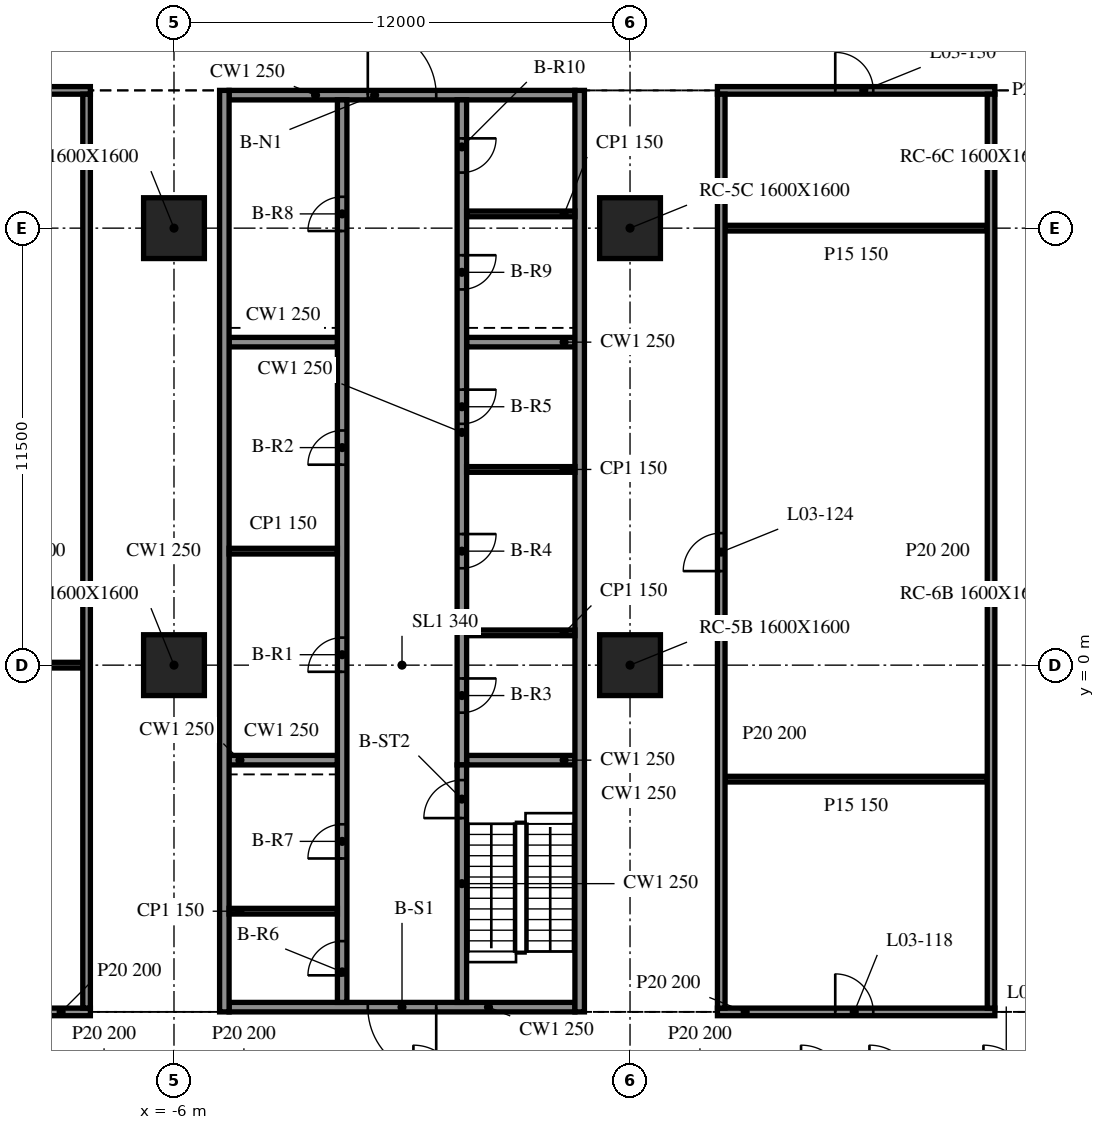
"""IFC4 building model, lengths in metres.
Left out: names, types, materials, properties, quantities, classifications, styles, units other than length and angle.
Written with IfcOpenShell. Run it as: python <this file> out.ifc"""

import sys

from ifc_helpers import new_model, si_unit, direction, frame, frame_2d, origin, origin_2d, place, context, subcontext, project, spatial, rectangle, extrude, element, fill, save


model = new_model("IFC4")
c1 = context("Model", 3, precision=1e-05, world=origin(), true_north=direction((0.0, 1.0)))
c2 = subcontext(c1, "Body", "Model", "MODEL_VIEW")
j1 = project(units=[si_unit("LENGTHUNIT", "METRE"), si_unit("PLANEANGLEUNIT", "RADIAN")], contexts=[c1])
p1 = place(None, origin())
s1 = spatial("IfcSite", under=j1, at=p1, CompositionType="ELEMENT")
p2 = place(p1, origin())
s2 = spatial("IfcBuilding", under=s1, at=p2, CompositionType="ELEMENT")
p3 = place(p2, frame((0.0, 0.0, 15.8)))
s3 = spatial("IfcBuildingStorey", under=s2, at=p3, CompositionType="ELEMENT", Elevation=15.8)
for number, where, z_axis, x_axis in (
    (1, (-6.0, 0.0, -0.34), (0.0, 0.0, 1.0), (1.0, 0.0, 0.0)),
    (2, (-6.0, 11.5, -0.34), (0.0, 0.0, 1.0), (1.0, 0.0, 0.0)),
    (3, (6.0, 0.0, -0.34), (0.0, 0.0, 1.0), (1.0, 0.0, 0.0)),
    (4, (6.0, 11.5, -0.34), (0.0, 0.0, 1.0), (1.0, 0.0, 0.0)),
):
    element("IfcColumn", number, at=place(p3, frame(where, z_axis=z_axis, x_axis=x_axis)), inside=s3, PredefinedType="COLUMN", context=c2, shape_type="SweptSolid", body=[
        extrude(rectangle(XDim=1.6, YDim=1.6, at=origin_2d()), origin(), (0.0, 0.0, 1.0), 4.3),
    ])
for number, where, z_axis, x_axis in (
    (5, (-4.675, 15.125, 0.0), (0.0, 0.0, 1.0), (0.0, -1.0, 0.0)),
    (6, (4.675, -9.125, 0.0), (0.0, 0.0, 1.0), (0.0, 1.0, 0.0)),
):
    element("IfcWall", number, at=place(p3, frame(where, z_axis=z_axis, x_axis=x_axis)), inside=s3, PredefinedType="SOLIDWALL", context=c2, shape_type="SweptSolid", body=[
        extrude(rectangle(XDim=24.25, YDim=0.25, at=frame_2d((12.125, 0.0))), origin(), (0.0, 0.0, 1.0), 3.96),
    ])
p4 = place(p3, frame((4.55, -9.0, 0.0), z_axis=(0.0, 0.0, 1.0), x_axis=(-1.0, 0.0, 0.0)))
e7 = element("IfcWall", 7, at=p4, inside=s3, PredefinedType="SOLIDWALL", context=c2, shape_type="SweptSolid", body=[
    extrude(rectangle(XDim=9.1, YDim=0.25, at=frame_2d((4.55, 0.0))), origin(), (0.0, 0.0, 1.0), 3.96),
])
p5 = place(p4, frame((3.65, 0.0, 0.0)))
e8 = element("IfcOpeningElement", 8, at=p5, cuts=e7, PredefinedType="OPENING", context=c2, shape_type="SweptSolid", body=[
    extrude(rectangle(XDim=1.8, YDim=2.1, at=frame_2d((0.9, 1.05))), frame((0.0, 0.135, 0.0), z_axis=(0.0, -1.0, 0.0), x_axis=(1.0, 0.0, 0.0)), (0.0, 0.0, 1.0), 0.27),
])
p6 = place(p3, frame((-4.55, 15.0, 0.0), z_axis=(0.0, 0.0, 1.0), x_axis=(1.0, 0.0, 0.0)))
e9 = element("IfcWall", 9, at=p6, inside=s3, PredefinedType="SOLIDWALL", context=c2, shape_type="SweptSolid", body=[
    extrude(rectangle(XDim=9.1, YDim=0.25, at=frame_2d((4.55, 0.0))), origin(), (0.0, 0.0, 1.0), 3.96),
])
p7 = place(p6, frame((3.65, 0.0, 0.0)))
e10 = element("IfcOpeningElement", 10, at=p7, cuts=e9, PredefinedType="OPENING", context=c2, shape_type="SweptSolid", body=[
    extrude(rectangle(XDim=1.8, YDim=2.1, at=frame_2d((0.9, 1.05))), frame((0.0, 0.135, 0.0), z_axis=(0.0, -1.0, 0.0), x_axis=(1.0, 0.0, 0.0)), (0.0, 0.0, 1.0), 0.27),
])
p8 = place(p3, frame((-1.575, -8.875, 0.0), z_axis=(0.0, 0.0, 1.0), x_axis=(0.0, 1.0, 0.0)))
e11 = element("IfcWall", 11, at=p8, inside=s3, PredefinedType="SOLIDWALL", context=c2, shape_type="SweptSolid", body=[
    extrude(rectangle(XDim=23.75, YDim=0.25, at=frame_2d((11.875, 0.0))), origin(), (0.0, 0.0, 1.0), 3.96),
])
p9 = place(p8, frame((8.7, 0.0, 0.0)))
e12 = element("IfcOpeningElement", 12, at=p9, cuts=e11, PredefinedType="OPENING", context=c2, shape_type="SweptSolid", body=[
    extrude(rectangle(XDim=0.9, YDim=2.1, at=frame_2d((0.45, 1.05))), frame((0.0, 0.135, 0.0), z_axis=(0.0, -1.0, 0.0), x_axis=(1.0, 0.0, 0.0)), (0.0, 0.0, 1.0), 0.27),
])
p10 = place(p8, frame((14.15, 0.0, 0.0)))
e13 = element("IfcOpeningElement", 13, at=p10, cuts=e11, PredefinedType="OPENING", context=c2, shape_type="SweptSolid", body=[
    extrude(rectangle(XDim=0.9, YDim=2.1, at=frame_2d((0.45, 1.05))), frame((0.0, 0.135, 0.0), z_axis=(0.0, -1.0, 0.0), x_axis=(1.0, 0.0, 0.0)), (0.0, 0.0, 1.0), 0.27),
])
p11 = place(p8, frame((0.712, 0.0, 0.0)))
e14 = element("IfcOpeningElement", 14, at=p11, cuts=e11, PredefinedType="OPENING", context=c2, shape_type="SweptSolid", body=[
    extrude(rectangle(XDim=0.9, YDim=2.1, at=frame_2d((0.45, 1.05))), frame((0.0, 0.135, 0.0), z_axis=(0.0, -1.0, 0.0), x_axis=(1.0, 0.0, 0.0)), (0.0, 0.0, 1.0), 0.27),
])
p12 = place(p8, frame((3.788, 0.0, 0.0)))
e15 = element("IfcOpeningElement", 15, at=p12, cuts=e11, PredefinedType="OPENING", context=c2, shape_type="SweptSolid", body=[
    extrude(rectangle(XDim=0.9, YDim=2.1, at=frame_2d((0.45, 1.05))), frame((0.0, 0.135, 0.0), z_axis=(0.0, -1.0, 0.0), x_axis=(1.0, 0.0, 0.0)), (0.0, 0.0, 1.0), 0.27),
])
p13 = place(p8, frame((20.3, 0.0, 0.0)))
e16 = element("IfcOpeningElement", 16, at=p13, cuts=e11, PredefinedType="OPENING", context=c2, shape_type="SweptSolid", body=[
    extrude(rectangle(XDim=0.9, YDim=2.1, at=frame_2d((0.45, 1.05))), frame((0.0, 0.135, 0.0), z_axis=(0.0, -1.0, 0.0), x_axis=(1.0, 0.0, 0.0)), (0.0, 0.0, 1.0), 0.27),
])
p14 = place(p3, frame((1.575, -8.875, 0.0), z_axis=(0.0, 0.0, 1.0), x_axis=(0.0, 1.0, 0.0)))
e17 = element("IfcWall", 17, at=p14, inside=s3, PredefinedType="SOLIDWALL", context=c2, shape_type="SweptSolid", body=[
    extrude(rectangle(XDim=6.25, YDim=0.25, at=frame_2d((3.125, 0.0))), origin(), (0.0, 0.0, 1.0), 3.96),
])
p15 = place(p14, frame((4.85, 0.0, 0.0)))
e18 = element("IfcOpeningElement", 18, at=p15, cuts=e17, PredefinedType="OPENING", context=c2, shape_type="SweptSolid", body=[
    extrude(rectangle(XDim=1.0, YDim=2.1, at=frame_2d((0.5, 1.05))), frame((0.0, 0.135, 0.0), z_axis=(0.0, -1.0, 0.0), x_axis=(1.0, 0.0, 0.0)), (0.0, 0.0, 1.0), 0.27),
])
p16 = place(p3, frame((1.575, 14.875, 0.0), z_axis=(0.0, 0.0, 1.0), x_axis=(0.0, -1.0, 0.0)))
e19 = element("IfcWall", 19, at=p16, inside=s3, PredefinedType="SOLIDWALL", context=c2, shape_type="SweptSolid", body=[
    extrude(rectangle(XDim=17.5, YDim=0.25, at=frame_2d((8.75, 0.0))), origin(), (0.0, 0.0, 1.0), 3.96),
])
p17 = place(p16, frame((15.225, 0.0, 0.0)))
e20 = element("IfcOpeningElement", 20, at=p17, cuts=e19, PredefinedType="OPENING", context=c2, shape_type="SweptSolid", body=[
    extrude(rectangle(XDim=0.9, YDim=2.1, at=frame_2d((0.45, 1.05))), frame((0.0, 0.135, 0.0), z_axis=(0.0, -1.0, 0.0), x_axis=(1.0, 0.0, 0.0)), (0.0, 0.0, 1.0), 0.27),
])
p18 = place(p16, frame((11.425, 0.0, 0.0)))
e21 = element("IfcOpeningElement", 21, at=p18, cuts=e19, PredefinedType="OPENING", context=c2, shape_type="SweptSolid", body=[
    extrude(rectangle(XDim=0.9, YDim=2.1, at=frame_2d((0.45, 1.05))), frame((0.0, 0.135, 0.0), z_axis=(0.0, -1.0, 0.0), x_axis=(1.0, 0.0, 0.0)), (0.0, 0.0, 1.0), 0.27),
])
p19 = place(p16, frame((7.625, 0.0, 0.0)))
e22 = element("IfcOpeningElement", 22, at=p19, cuts=e19, PredefinedType="OPENING", context=c2, shape_type="SweptSolid", body=[
    extrude(rectangle(XDim=0.9, YDim=2.1, at=frame_2d((0.45, 1.05))), frame((0.0, 0.135, 0.0), z_axis=(0.0, -1.0, 0.0), x_axis=(1.0, 0.0, 0.0)), (0.0, 0.0, 1.0), 0.27),
])
p20 = place(p16, frame((4.087, 0.0, 0.0)))
e23 = element("IfcOpeningElement", 23, at=p20, cuts=e19, PredefinedType="OPENING", context=c2, shape_type="SweptSolid", body=[
    extrude(rectangle(XDim=0.9, YDim=2.1, at=frame_2d((0.45, 1.05))), frame((0.0, 0.135, 0.0), z_axis=(0.0, -1.0, 0.0), x_axis=(1.0, 0.0, 0.0)), (0.0, 0.0, 1.0), 0.27),
])
p21 = place(p16, frame((1.012, 0.0, 0.0)))
e24 = element("IfcOpeningElement", 24, at=p21, cuts=e19, PredefinedType="OPENING", context=c2, shape_type="SweptSolid", body=[
    extrude(rectangle(XDim=0.9, YDim=2.1, at=frame_2d((0.45, 1.05))), frame((0.0, 0.135, 0.0), z_axis=(0.0, -1.0, 0.0), x_axis=(1.0, 0.0, 0.0)), (0.0, 0.0, 1.0), 0.27),
])
for number, where, z_axis, x_axis in (
    (25, (-4.55, -2.5, 0.0), (0.0, 0.0, 1.0), (1.0, 0.0, 0.0)),
    (26, (-4.55, 8.5, 0.0), (0.0, 0.0, 1.0), (1.0, 0.0, 0.0)),
    (27, (1.7, -2.5, 0.0), (0.0, 0.0, 1.0), (1.0, 0.0, 0.0)),
    (28, (1.7, 8.5, 0.0), (0.0, 0.0, 1.0), (1.0, 0.0, 0.0)),
):
    element("IfcWall", number, at=place(p3, frame(where, z_axis=z_axis, x_axis=x_axis)), inside=s3, PredefinedType="SOLIDWALL", context=c2, shape_type="SweptSolid", body=[
        extrude(rectangle(XDim=2.85, YDim=0.25, at=frame_2d((1.425, 0.0))), origin(), (0.0, 0.0, 1.0), 3.96),
    ])
for number, where, z_axis, x_axis in (
    (29, (-4.55, 3.0, 0.0), (0.0, 0.0, 1.0), (1.0, 0.0, 0.0)),
    (30, (1.7, 0.85, 0.0), (0.0, 0.0, 1.0), (1.0, 0.0, 0.0)),
    (31, (1.7, 5.15, 0.0), (0.0, 0.0, 1.0), (1.0, 0.0, 0.0)),
    (32, (-4.55, -6.475, 0.0), (0.0, 0.0, 1.0), (1.0, 0.0, 0.0)),
    (33, (1.7, 11.875, 0.0), (0.0, 0.0, 1.0), (1.0, 0.0, 0.0)),
):
    element("IfcWall", number, at=place(p3, frame(where, z_axis=z_axis, x_axis=x_axis)), inside=s3, PredefinedType="PARTITIONING", context=c2, shape_type="SweptSolid", body=[
        extrude(rectangle(XDim=2.85, YDim=0.15, at=frame_2d((1.425, 0.0))), origin(), (0.0, 0.0, 1.0), 3.96),
    ])
p22 = place(p3, frame((-15.9, -9.125, 0.0), z_axis=(0.0, 0.0, 1.0), x_axis=(1.0, 0.0, 0.0)))
e34 = element("IfcWall", 34, at=p22, inside=s3, PredefinedType="PARTITIONING", context=c2, shape_type="SweptSolid", body=[
    extrude(rectangle(XDim=7.7, YDim=0.2, at=frame_2d((3.85, 0.0))), origin(), (0.0, 0.0, 1.0), 3.96),
])
p23 = place(p22, frame((3.3, 0.0, 0.0)))
e35 = element("IfcOpeningElement", 35, at=p23, cuts=e34, PredefinedType="OPENING", context=c2, shape_type="SweptSolid", body=[
    extrude(rectangle(XDim=1.0, YDim=2.1, at=frame_2d((0.5, 1.05))), frame((0.0, 0.11, 0.0), z_axis=(0.0, -1.0, 0.0), x_axis=(1.0, 0.0, 0.0)), (0.0, 0.0, 1.0), 0.22),
])
p24 = place(p3, frame((8.3, -9.125, 0.0), z_axis=(0.0, 0.0, 1.0), x_axis=(1.0, 0.0, 0.0)))
e36 = element("IfcWall", 36, at=p24, inside=s3, PredefinedType="PARTITIONING", context=c2, shape_type="SweptSolid", body=[
    extrude(rectangle(XDim=7.3, YDim=0.2, at=frame_2d((3.65, 0.0))), origin(), (0.0, 0.0, 1.0), 3.96),
])
p25 = place(p24, frame((3.1, 0.0, 0.0)))
e37 = element("IfcOpeningElement", 37, at=p25, cuts=e36, PredefinedType="OPENING", context=c2, shape_type="SweptSolid", body=[
    extrude(rectangle(XDim=1.0, YDim=2.1, at=frame_2d((0.5, 1.05))), frame((0.0, 0.11, 0.0), z_axis=(0.0, -1.0, 0.0), x_axis=(1.0, 0.0, 0.0)), (0.0, 0.0, 1.0), 0.22),
])
p26 = place(p3, frame((8.5, -3.0, 0.0), z_axis=(0.0, 0.0, 1.0), x_axis=(1.0, 0.0, 0.0)))
e38 = element("IfcWall", 38, at=p26, inside=s3, PredefinedType="PARTITIONING", context=c2, shape_type="SweptSolid", body=[
    extrude(rectangle(XDim=6.9, YDim=0.15, at=frame_2d((3.45, 0.0))), origin(), (0.0, 0.0, 1.0), 3.96),
])
p27 = place(p3, frame((-15.7, 0.0, 0.0), z_axis=(0.0, 0.0, 1.0), x_axis=(1.0, 0.0, 0.0)))
e39 = element("IfcWall", 39, at=p27, inside=s3, PredefinedType="PARTITIONING", context=c2, shape_type="SweptSolid", body=[
    extrude(rectangle(XDim=7.3, YDim=0.15, at=frame_2d((3.65, 0.0))), origin(), (0.0, 0.0, 1.0), 3.96),
])
p28 = place(p3, frame((8.5, 11.5, 0.0), z_axis=(0.0, 0.0, 1.0), x_axis=(1.0, 0.0, 0.0)))
e40 = element("IfcWall", 40, at=p28, inside=s3, PredefinedType="PARTITIONING", context=c2, shape_type="SweptSolid", body=[
    extrude(rectangle(XDim=6.9, YDim=0.15, at=frame_2d((3.45, 0.0))), origin(), (0.0, 0.0, 1.0), 3.96),
])
p29 = place(p3, frame((-15.9, 15.125, 0.0), z_axis=(0.0, 0.0, 1.0), x_axis=(1.0, 0.0, 0.0)))
e41 = element("IfcWall", 41, at=p29, inside=s3, PredefinedType="PARTITIONING", context=c2, shape_type="SweptSolid", body=[
    extrude(rectangle(XDim=7.7, YDim=0.2, at=frame_2d((3.85, 0.0))), origin(), (0.0, 0.0, 1.0), 3.96),
])
p30 = place(p3, frame((8.3, 15.125, 0.0), z_axis=(0.0, 0.0, 1.0), x_axis=(1.0, 0.0, 0.0)))
e42 = element("IfcWall", 42, at=p30, inside=s3, PredefinedType="PARTITIONING", context=c2, shape_type="SweptSolid", body=[
    extrude(rectangle(XDim=7.3, YDim=0.2, at=frame_2d((3.65, 0.0))), origin(), (0.0, 0.0, 1.0), 3.96),
])
p31 = place(p30, frame((3.1, 0.0, 0.0)))
e43 = element("IfcOpeningElement", 43, at=p31, cuts=e42, PredefinedType="OPENING", context=c2, shape_type="SweptSolid", body=[
    extrude(rectangle(XDim=1.0, YDim=2.1, at=frame_2d((0.5, 1.05))), frame((0.0, 0.11, 0.0), z_axis=(0.0, -1.0, 0.0), x_axis=(1.0, 0.0, 0.0)), (0.0, 0.0, 1.0), 0.22),
])
p32 = place(p3, frame((-8.3, -9.025, 0.0), z_axis=(0.0, 0.0, 1.0), x_axis=(0.0, 1.0, 0.0)))
e44 = element("IfcWall", 44, at=p32, inside=s3, PredefinedType="PARTITIONING", context=c2, shape_type="SweptSolid", body=[
    extrude(rectangle(XDim=24.05, YDim=0.2, at=frame_2d((12.025, 0.0))), origin(), (0.0, 0.0, 1.0), 3.96),
])
p33 = place(p3, frame((8.4, -9.025, 0.0), z_axis=(0.0, 0.0, 1.0), x_axis=(0.0, 1.0, 0.0)))
e45 = element("IfcWall", 45, at=p33, inside=s3, PredefinedType="PARTITIONING", context=c2, shape_type="SweptSolid", body=[
    extrude(rectangle(XDim=24.05, YDim=0.2, at=frame_2d((12.025, 0.0))), origin(), (0.0, 0.0, 1.0), 3.96),
])
p34 = place(p33, frame((11.5, 0.0, 0.0)))
e46 = element("IfcOpeningElement", 46, at=p34, cuts=e45, PredefinedType="OPENING", context=c2, shape_type="SweptSolid", body=[
    extrude(rectangle(XDim=1.0, YDim=2.1, at=frame_2d((0.5, 1.05))), frame((0.0, 0.11, 0.0), z_axis=(0.0, -1.0, 0.0), x_axis=(1.0, 0.0, 0.0)), (0.0, 0.0, 1.0), 0.22),
])
p35 = place(p3, frame((15.5, -9.025, 0.0), z_axis=(0.0, 0.0, 1.0), x_axis=(0.0, 1.0, 0.0)))
e47 = element("IfcWall", 47, at=p35, inside=s3, PredefinedType="PARTITIONING", context=c2, shape_type="SweptSolid", body=[
    extrude(rectangle(XDim=24.05, YDim=0.2, at=frame_2d((12.025, 0.0))), origin(), (0.0, 0.0, 1.0), 3.96),
])
p36 = place(p5, origin())
e48 = element("IfcDoor", 48, at=p36, inside=s3, OperationType="DOUBLE_DOOR_SINGLE_SWING", PredefinedType="DOOR", context=c2, shape_type="SweptSolid", body=[
    extrude(rectangle(XDim=1.8, YDim=2.1, at=frame_2d((0.9, 1.05))), frame((0.0, 0.025, 0.0), z_axis=(0.0, -1.0, 0.0), x_axis=(1.0, 0.0, 0.0)), (0.0, 0.0, 1.0), 0.05),
])
fill(e8, e48)
p37 = place(p7, origin())
e49 = element("IfcDoor", 49, at=p37, inside=s3, OperationType="DOUBLE_DOOR_SINGLE_SWING", PredefinedType="DOOR", context=c2, shape_type="SweptSolid", body=[
    extrude(rectangle(XDim=1.8, YDim=2.1, at=frame_2d((0.9, 1.05))), frame((0.0, 0.025, 0.0), z_axis=(0.0, -1.0, 0.0), x_axis=(1.0, 0.0, 0.0)), (0.0, 0.0, 1.0), 0.05),
])
fill(e10, e49)
p38 = place(p9, origin())
e50 = element("IfcDoor", 50, at=p38, inside=s3, OperationType="SINGLE_SWING_LEFT", PredefinedType="DOOR", context=c2, shape_type="SweptSolid", body=[
    extrude(rectangle(XDim=0.9, YDim=2.1, at=frame_2d((0.45, 1.05))), frame((0.0, 0.025, 0.0), z_axis=(0.0, -1.0, 0.0), x_axis=(1.0, 0.0, 0.0)), (0.0, 0.0, 1.0), 0.05),
])
fill(e12, e50)
p39 = place(p10, origin())
e51 = element("IfcDoor", 51, at=p39, inside=s3, OperationType="SINGLE_SWING_RIGHT", PredefinedType="DOOR", context=c2, shape_type="SweptSolid", body=[
    extrude(rectangle(XDim=0.9, YDim=2.1, at=frame_2d((0.45, 1.05))), frame((0.0, 0.025, 0.0), z_axis=(0.0, -1.0, 0.0), x_axis=(1.0, 0.0, 0.0)), (0.0, 0.0, 1.0), 0.05),
])
fill(e13, e51)
p40 = place(p17, origin())
e52 = element("IfcDoor", 52, at=p40, inside=s3, OperationType="SINGLE_SWING_LEFT", PredefinedType="DOOR", context=c2, shape_type="SweptSolid", body=[
    extrude(rectangle(XDim=0.9, YDim=2.1, at=frame_2d((0.45, 1.05))), frame((0.0, 0.025, 0.0), z_axis=(0.0, -1.0, 0.0), x_axis=(1.0, 0.0, 0.0)), (0.0, 0.0, 1.0), 0.05),
])
fill(e20, e52)
p41 = place(p18, origin())
e53 = element("IfcDoor", 53, at=p41, inside=s3, OperationType="SINGLE_SWING_RIGHT", PredefinedType="DOOR", context=c2, shape_type="SweptSolid", body=[
    extrude(rectangle(XDim=0.9, YDim=2.1, at=frame_2d((0.45, 1.05))), frame((0.0, 0.025, 0.0), z_axis=(0.0, -1.0, 0.0), x_axis=(1.0, 0.0, 0.0)), (0.0, 0.0, 1.0), 0.05),
])
fill(e21, e53)
p42 = place(p19, origin())
e54 = element("IfcDoor", 54, at=p42, inside=s3, OperationType="SINGLE_SWING_LEFT", PredefinedType="DOOR", context=c2, shape_type="SweptSolid", body=[
    extrude(rectangle(XDim=0.9, YDim=2.1, at=frame_2d((0.45, 1.05))), frame((0.0, 0.025, 0.0), z_axis=(0.0, -1.0, 0.0), x_axis=(1.0, 0.0, 0.0)), (0.0, 0.0, 1.0), 0.05),
])
fill(e22, e54)
p43 = place(p11, origin())
e55 = element("IfcDoor", 55, at=p43, inside=s3, OperationType="SINGLE_SWING_RIGHT", PredefinedType="DOOR", context=c2, shape_type="SweptSolid", body=[
    extrude(rectangle(XDim=0.9, YDim=2.1, at=frame_2d((0.45, 1.05))), frame((0.0, 0.025, 0.0), z_axis=(0.0, -1.0, 0.0), x_axis=(1.0, 0.0, 0.0)), (0.0, 0.0, 1.0), 0.05),
])
fill(e14, e55)
p44 = place(p12, origin())
e56 = element("IfcDoor", 56, at=p44, inside=s3, OperationType="SINGLE_SWING_LEFT", PredefinedType="DOOR", context=c2, shape_type="SweptSolid", body=[
    extrude(rectangle(XDim=0.9, YDim=2.1, at=frame_2d((0.45, 1.05))), frame((0.0, 0.025, 0.0), z_axis=(0.0, -1.0, 0.0), x_axis=(1.0, 0.0, 0.0)), (0.0, 0.0, 1.0), 0.05),
])
fill(e15, e56)
p45 = place(p13, origin())
e57 = element("IfcDoor", 57, at=p45, inside=s3, OperationType="SINGLE_SWING_RIGHT", PredefinedType="DOOR", context=c2, shape_type="SweptSolid", body=[
    extrude(rectangle(XDim=0.9, YDim=2.1, at=frame_2d((0.45, 1.05))), frame((0.0, 0.025, 0.0), z_axis=(0.0, -1.0, 0.0), x_axis=(1.0, 0.0, 0.0)), (0.0, 0.0, 1.0), 0.05),
])
fill(e16, e57)
p46 = place(p20, origin())
e58 = element("IfcDoor", 58, at=p46, inside=s3, OperationType="SINGLE_SWING_LEFT", PredefinedType="DOOR", context=c2, shape_type="SweptSolid", body=[
    extrude(rectangle(XDim=0.9, YDim=2.1, at=frame_2d((0.45, 1.05))), frame((0.0, 0.025, 0.0), z_axis=(0.0, -1.0, 0.0), x_axis=(1.0, 0.0, 0.0)), (0.0, 0.0, 1.0), 0.05),
])
fill(e23, e58)
p47 = place(p21, origin())
e59 = element("IfcDoor", 59, at=p47, inside=s3, OperationType="SINGLE_SWING_RIGHT", PredefinedType="DOOR", context=c2, shape_type="SweptSolid", body=[
    extrude(rectangle(XDim=0.9, YDim=2.1, at=frame_2d((0.45, 1.05))), frame((0.0, 0.025, 0.0), z_axis=(0.0, -1.0, 0.0), x_axis=(1.0, 0.0, 0.0)), (0.0, 0.0, 1.0), 0.05),
])
fill(e24, e59)
p48 = place(p15, origin())
e60 = element("IfcDoor", 60, at=p48, inside=s3, OperationType="SINGLE_SWING_LEFT", PredefinedType="DOOR", context=c2, shape_type="SweptSolid", body=[
    extrude(rectangle(XDim=1.0, YDim=2.1, at=frame_2d((0.5, 1.05))), frame((0.0, 0.025, 0.0), z_axis=(0.0, -1.0, 0.0), x_axis=(1.0, 0.0, 0.0)), (0.0, 0.0, 1.0), 0.05),
])
fill(e18, e60)
p49 = place(p25, origin())
e61 = element("IfcDoor", 61, at=p49, inside=s3, OperationType="SINGLE_SWING_LEFT", PredefinedType="DOOR", context=c2, shape_type="SweptSolid", body=[
    extrude(rectangle(XDim=1.0, YDim=2.1, at=frame_2d((0.5, 1.05))), frame((0.0, 0.025, 0.0), z_axis=(0.0, -1.0, 0.0), x_axis=(1.0, 0.0, 0.0)), (0.0, 0.0, 1.0), 0.05),
])
fill(e37, e61)
p50 = place(p34, origin())
e62 = element("IfcDoor", 62, at=p50, inside=s3, OperationType="SINGLE_SWING_RIGHT", PredefinedType="DOOR", context=c2, shape_type="SweptSolid", body=[
    extrude(rectangle(XDim=1.0, YDim=2.1, at=frame_2d((0.5, 1.05))), frame((0.0, 0.025, 0.0), z_axis=(0.0, -1.0, 0.0), x_axis=(1.0, 0.0, 0.0)), (0.0, 0.0, 1.0), 0.05),
])
fill(e46, e62)
p51 = place(p31, origin())
e63 = element("IfcDoor", 63, at=p51, inside=s3, OperationType="SINGLE_SWING_RIGHT", PredefinedType="DOOR", context=c2, shape_type="SweptSolid", body=[
    extrude(rectangle(XDim=1.0, YDim=2.1, at=frame_2d((0.5, 1.05))), frame((0.0, 0.025, 0.0), z_axis=(0.0, -1.0, 0.0), x_axis=(1.0, 0.0, 0.0)), (0.0, 0.0, 1.0), 0.05),
])
fill(e43, e63)
save(model, sys.argv[1])
